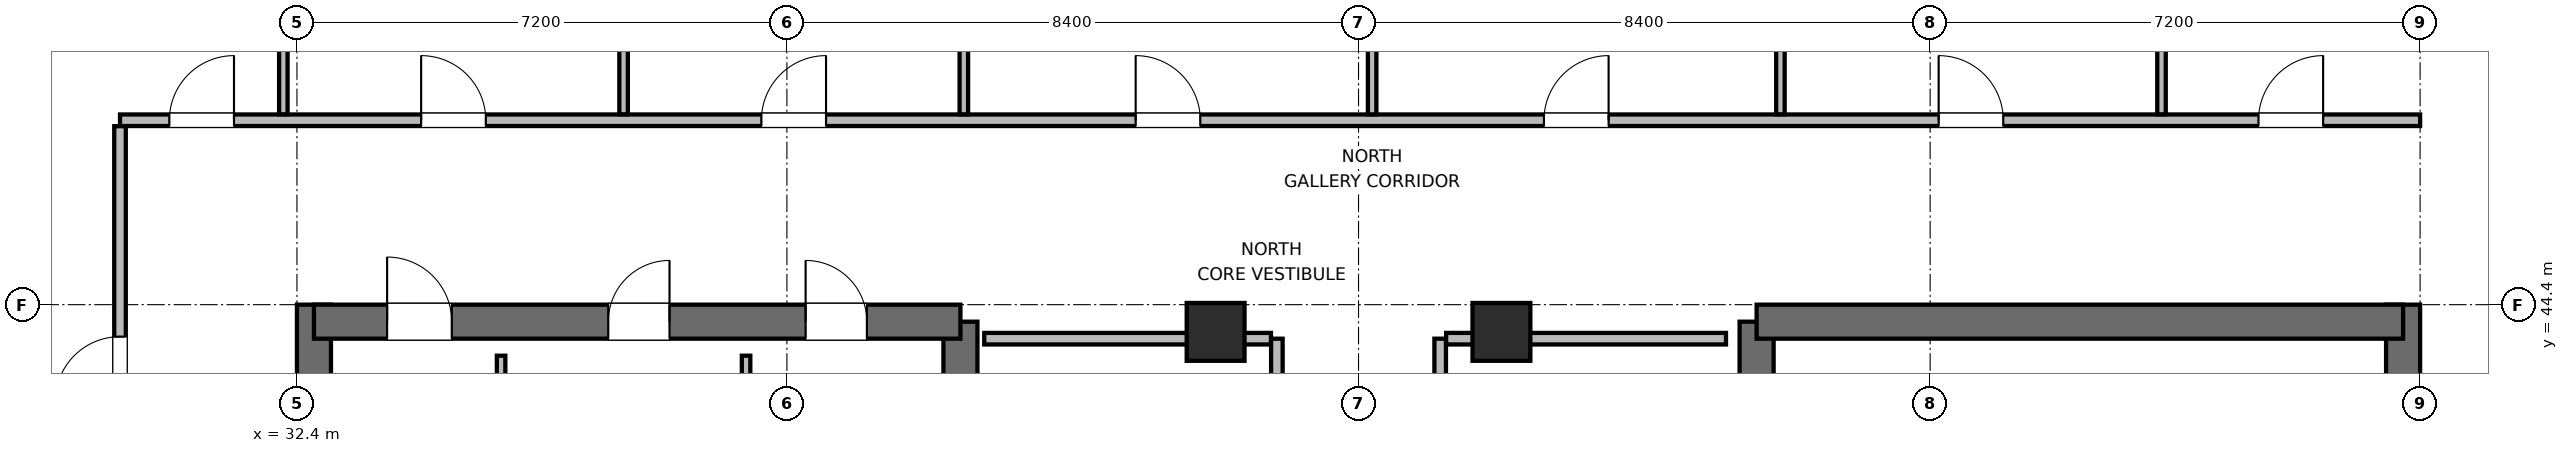
"""IFC4 building model, lengths in metres.
Left out: names, types, materials, properties, quantities, classifications, styles, units other than length and angle.
Written with IfcOpenShell. Run it as: python <this file> out.ifc"""

import sys

from ifc_helpers import new_model, si_unit, direction, frame, frame_2d, origin, origin_2d, place, context, subcontext, project, spatial, rectangle, extrude, element, fill, save


model = new_model("IFC4")
c1 = context("Model", 3, precision=1e-05, world=origin(), true_north=direction((0.0, 1.0)))
c2 = subcontext(c1, "Body", "Model", "MODEL_VIEW")
j1 = project(units=[si_unit("LENGTHUNIT", "METRE"), si_unit("PLANEANGLEUNIT", "RADIAN")], contexts=[c1])
p1 = place(None, origin())
s1 = spatial("IfcSite", under=j1, at=p1, CompositionType="ELEMENT")
p2 = place(p1, origin())
s2 = spatial("IfcBuilding", under=s1, at=p2, CompositionType="ELEMENT")
p3 = place(p2, frame((0.0, 0.0, 262.8)))
s3 = spatial("IfcBuildingStorey", under=s2, at=p3, CompositionType="ELEMENT", Elevation=262.8)
p4 = place(p3, frame((32.65, 27.6, 0.0), z_axis=(0.0, 0.0, 1.0), x_axis=(0.0, 1.0, 0.0)))
e1 = element("IfcWall", 1, at=p4, inside=s3, PredefinedType="SHEAR", context=c2, shape_type="SweptSolid", body=[
    extrude(rectangle(XDim=16.8, YDim=0.5, at=frame_2d((8.4, 0.0))), origin(), (0.0, 0.0, 1.0), 3.9),
])
p5 = place(p3, frame((42.15, 37.8, 0.0), z_axis=(0.0, 0.0, 1.0), x_axis=(0.0, 1.0, 0.0)))
e2 = element("IfcWall", 2, at=p5, inside=s3, PredefinedType="SHEAR", context=c2, shape_type="SweptSolid", body=[
    extrude(rectangle(XDim=6.35, YDim=0.5, at=frame_2d((3.175, 0.0))), origin(), (0.0, 0.0, 1.0), 3.9),
])
p6 = place(p3, frame((32.65, 44.15, 0.0), z_axis=(0.0, 0.0, 1.0), x_axis=(1.0, 0.0, 0.0)))
e3 = element("IfcWall", 3, at=p6, inside=s3, PredefinedType="SHEAR", context=c2, shape_type="SweptSolid", body=[
    extrude(rectangle(XDim=9.5, YDim=0.5, at=frame_2d((4.75, 0.0))), origin(), (0.0, 0.0, 1.0), 3.9),
])
p7 = place(p6, frame((1.075, 0.0, 0.0)))
e4 = element("IfcOpeningElement", 4, at=p7, cuts=e3, PredefinedType="OPENING", context=c2, shape_type="SweptSolid", body=[
    extrude(rectangle(XDim=0.95, YDim=2.04, at=frame_2d((0.475, 1.02))), frame((0.0, 0.26, 0.0), z_axis=(0.0, -1.0, 0.0), x_axis=(1.0, 0.0, 0.0)), (0.0, 0.0, 1.0), 0.52),
])
p8 = place(p6, frame((4.325, 0.0, 0.0)))
e5 = element("IfcOpeningElement", 5, at=p8, cuts=e3, PredefinedType="OPENING", context=c2, shape_type="SweptSolid", body=[
    extrude(rectangle(XDim=0.9, YDim=2.02, at=frame_2d((0.45, 1.01))), frame((0.0, 0.26, 0.0), z_axis=(0.0, -1.0, 0.0), x_axis=(1.0, 0.0, 0.0)), (0.0, 0.0, 1.0), 0.52),
])
p9 = place(p6, frame((7.225, 0.0, 0.0)))
e6 = element("IfcOpeningElement", 6, at=p9, cuts=e3, PredefinedType="OPENING", context=c2, shape_type="SweptSolid", body=[
    extrude(rectangle(XDim=0.9, YDim=2.02, at=frame_2d((0.45, 1.01))), frame((0.0, 0.26, 0.0), z_axis=(0.0, -1.0, 0.0), x_axis=(1.0, 0.0, 0.0)), (0.0, 0.0, 1.0), 0.52),
])
p10 = place(p3, frame((53.85, 38.0, 0.0), z_axis=(0.0, 0.0, 1.0), x_axis=(0.0, 1.0, 0.0)))
e7 = element("IfcWall", 7, at=p10, inside=s3, PredefinedType="SHEAR", context=c2, shape_type="SweptSolid", body=[
    extrude(rectangle(XDim=6.15, YDim=0.5, at=frame_2d((3.075, 0.0))), origin(), (0.0, 0.0, 1.0), 3.9),
])
p11 = place(p3, frame((63.35, 27.6, 0.0), z_axis=(0.0, 0.0, 1.0), x_axis=(0.0, 1.0, 0.0)))
e8 = element("IfcWall", 8, at=p11, inside=s3, PredefinedType="SHEAR", context=c2, shape_type="SweptSolid", body=[
    extrude(rectangle(XDim=16.8, YDim=0.5, at=frame_2d((8.4, 0.0))), origin(), (0.0, 0.0, 1.0), 3.9),
])
p12 = place(p3, frame((53.85, 44.15, 0.0), z_axis=(0.0, 0.0, 1.0), x_axis=(1.0, 0.0, 0.0)))
e9 = element("IfcWall", 9, at=p12, inside=s3, PredefinedType="SHEAR", context=c2, shape_type="SweptSolid", body=[
    extrude(rectangle(XDim=9.5, YDim=0.5, at=frame_2d((4.75, 0.0))), origin(), (0.0, 0.0, 1.0), 3.9),
])
for number, where, z_axis, x_axis in (
    (10, (45.9, 44.0, 0.0), (0.0, 0.0, 1.0), (1.0, 0.0, 0.0)),
    (11, (50.1, 44.0, 0.0), (0.0, 0.0, 1.0), (1.0, 0.0, 0.0)),
):
    element("IfcColumn", number, at=place(p3, frame(where, z_axis=z_axis, x_axis=x_axis)), inside=s3, PredefinedType="COLUMN", context=c2, shape_type="SweptSolid", body=[
        extrude(rectangle(XDim=0.85, YDim=0.85, at=origin_2d()), origin(), (0.0, 0.0, 1.0), 3.9),
    ])
for number, where, z_axis, x_axis in (
    (12, (35.4, 41.095, 0.0), (0.0, 0.0, 1.0), (0.0, 1.0, 0.0)),
    (13, (39.0, 41.095, 0.0), (0.0, 0.0, 1.0), (0.0, 1.0, 0.0)),
):
    element("IfcWall", number, at=place(p3, frame(where, z_axis=z_axis, x_axis=x_axis)), inside=s3, PredefinedType="PARTITIONING", context=c2, shape_type="SweptSolid", body=[
        extrude(rectangle(XDim=2.555, YDim=0.125, at=frame_2d((1.277, 0.0))), origin(), (0.0, 0.0, 1.0), 3.68),
    ])
p13 = place(p3, frame((46.8, 37.9, 0.0), z_axis=(0.0, 0.0, 1.0), x_axis=(0.0, 1.0, 0.0)))
e14 = element("IfcWall", 14, at=p13, inside=s3, PredefinedType="PARTITIONING", context=c2, shape_type="SweptSolid", body=[
    extrude(rectangle(XDim=6.0, YDim=0.17, at=frame_2d((3.0, 0.0))), origin(), (0.0, 0.0, 1.0), 3.68),
])
p14 = place(p13, frame((1.47, 0.0, 0.0)))
e15 = element("IfcOpeningElement", 15, at=p14, cuts=e14, PredefinedType="OPENING", context=c2, shape_type="SweptSolid", body=[
    extrude(rectangle(XDim=0.9, YDim=2.02, at=frame_2d((0.45, 1.01))), frame((0.0, 0.095, 0.0), z_axis=(0.0, -1.0, 0.0), x_axis=(1.0, 0.0, 0.0)), (0.0, 0.0, 1.0), 0.19),
])
p15 = place(p13, frame((4.47, 0.0, 0.0)))
e16 = element("IfcOpeningElement", 16, at=p15, cuts=e14, PredefinedType="OPENING", context=c2, shape_type="SweptSolid", body=[
    extrude(rectangle(XDim=0.9, YDim=2.02, at=frame_2d((0.45, 1.01))), frame((0.0, 0.095, 0.0), z_axis=(0.0, -1.0, 0.0), x_axis=(1.0, 0.0, 0.0)), (0.0, 0.0, 1.0), 0.19),
])
p16 = place(p3, frame((42.5, 43.9, 0.0), z_axis=(0.0, 0.0, 1.0), x_axis=(1.0, 0.0, 0.0)))
e17 = element("IfcWall", 17, at=p16, inside=s3, PredefinedType="PARTITIONING", context=c2, shape_type="SweptSolid", body=[
    extrude(rectangle(XDim=4.213, YDim=0.17, at=frame_2d((2.106, 0.0))), origin(), (0.0, 0.0, 1.0), 2.765),
])
p17 = place(p3, frame((49.2, 37.9, 0.0), z_axis=(0.0, 0.0, 1.0), x_axis=(0.0, 1.0, 0.0)))
e18 = element("IfcWall", 18, at=p17, inside=s3, PredefinedType="PARTITIONING", context=c2, shape_type="SweptSolid", body=[
    extrude(rectangle(XDim=6.0, YDim=0.17, at=frame_2d((3.0, 0.0))), origin(), (0.0, 0.0, 1.0), 3.68),
])
p18 = place(p17, frame((2.55, 0.0, 0.0)))
e19 = element("IfcOpeningElement", 19, at=p18, cuts=e18, PredefinedType="OPENING", context=c2, shape_type="SweptSolid", body=[
    extrude(rectangle(XDim=0.9, YDim=2.02, at=frame_2d((0.45, 1.01))), frame((0.0, 0.095, 0.0), z_axis=(0.0, -1.0, 0.0), x_axis=(1.0, 0.0, 0.0)), (0.0, 0.0, 1.0), 0.19),
])
p19 = place(p3, frame((49.287, 43.9, 0.0), z_axis=(0.0, 0.0, 1.0), x_axis=(1.0, 0.0, 0.0)))
e20 = element("IfcWall", 20, at=p19, inside=s3, PredefinedType="PARTITIONING", context=c2, shape_type="SweptSolid", body=[
    extrude(rectangle(XDim=4.113, YDim=0.17, at=frame_2d((2.056, 0.0))), origin(), (0.0, 0.0, 1.0), 2.765),
])
p20 = place(p3, frame((29.8, 47.11, 0.0), z_axis=(0.0, 0.0, 1.0), x_axis=(1.0, 0.0, 0.0)))
e21 = element("IfcWall", 21, at=p20, inside=s3, PredefinedType="PARTITIONING", context=c2, shape_type="SweptSolid", body=[
    extrude(rectangle(XDim=33.8, YDim=0.17, at=frame_2d((16.9, 0.0))), origin(), (0.0, 0.0, 1.0), 3.68),
])
p21 = place(p20, frame((0.725, 0.0, 0.0)))
e22 = element("IfcOpeningElement", 22, at=p21, cuts=e21, PredefinedType="OPENING", context=c2, shape_type="SweptSolid", body=[
    extrude(rectangle(XDim=0.95, YDim=2.04, at=frame_2d((0.475, 1.02))), frame((0.0, 0.095, 0.0), z_axis=(0.0, -1.0, 0.0), x_axis=(1.0, 0.0, 0.0)), (0.0, 0.0, 1.0), 0.19),
])
p22 = place(p20, frame((4.425, 0.0, 0.0)))
e23 = element("IfcOpeningElement", 23, at=p22, cuts=e21, PredefinedType="OPENING", context=c2, shape_type="SweptSolid", body=[
    extrude(rectangle(XDim=0.95, YDim=2.04, at=frame_2d((0.475, 1.02))), frame((0.0, 0.095, 0.0), z_axis=(0.0, -1.0, 0.0), x_axis=(1.0, 0.0, 0.0)), (0.0, 0.0, 1.0), 0.19),
])
p23 = place(p20, frame((9.425, 0.0, 0.0)))
e24 = element("IfcOpeningElement", 24, at=p23, cuts=e21, PredefinedType="OPENING", context=c2, shape_type="SweptSolid", body=[
    extrude(rectangle(XDim=0.95, YDim=2.04, at=frame_2d((0.475, 1.02))), frame((0.0, 0.095, 0.0), z_axis=(0.0, -1.0, 0.0), x_axis=(1.0, 0.0, 0.0)), (0.0, 0.0, 1.0), 0.19),
])
p24 = place(p20, frame((14.925, 0.0, 0.0)))
e25 = element("IfcOpeningElement", 25, at=p24, cuts=e21, PredefinedType="OPENING", context=c2, shape_type="SweptSolid", body=[
    extrude(rectangle(XDim=0.95, YDim=2.04, at=frame_2d((0.475, 1.02))), frame((0.0, 0.095, 0.0), z_axis=(0.0, -1.0, 0.0), x_axis=(1.0, 0.0, 0.0)), (0.0, 0.0, 1.0), 0.19),
])
p25 = place(p20, frame((20.925, 0.0, 0.0)))
e26 = element("IfcOpeningElement", 26, at=p25, cuts=e21, PredefinedType="OPENING", context=c2, shape_type="SweptSolid", body=[
    extrude(rectangle(XDim=0.95, YDim=2.04, at=frame_2d((0.475, 1.02))), frame((0.0, 0.095, 0.0), z_axis=(0.0, -1.0, 0.0), x_axis=(1.0, 0.0, 0.0)), (0.0, 0.0, 1.0), 0.19),
])
p26 = place(p20, frame((26.725, 0.0, 0.0)))
e27 = element("IfcOpeningElement", 27, at=p26, cuts=e21, PredefinedType="OPENING", context=c2, shape_type="SweptSolid", body=[
    extrude(rectangle(XDim=0.95, YDim=2.04, at=frame_2d((0.475, 1.02))), frame((0.0, 0.095, 0.0), z_axis=(0.0, -1.0, 0.0), x_axis=(1.0, 0.0, 0.0)), (0.0, 0.0, 1.0), 0.19),
])
p27 = place(p20, frame((31.425, 0.0, 0.0)))
e28 = element("IfcOpeningElement", 28, at=p27, cuts=e21, PredefinedType="OPENING", context=c2, shape_type="SweptSolid", body=[
    extrude(rectangle(XDim=0.95, YDim=2.04, at=frame_2d((0.475, 1.02))), frame((0.0, 0.095, 0.0), z_axis=(0.0, -1.0, 0.0), x_axis=(1.0, 0.0, 0.0)), (0.0, 0.0, 1.0), 0.19),
])
p28 = place(p3, frame((29.8, 24.977, 0.0), z_axis=(0.0, 0.0, 1.0), x_axis=(0.0, 1.0, 0.0)))
e29 = element("IfcWall", 29, at=p28, inside=s3, PredefinedType="PARTITIONING", context=c2, shape_type="SweptSolid", body=[
    extrude(rectangle(XDim=22.046, YDim=0.17, at=frame_2d((11.023, 0.0))), origin(), (0.0, 0.0, 1.0), 3.68),
])
p29 = place(p28, frame((3.693, 0.0, 0.0)))
e30 = element("IfcOpeningElement", 30, at=p29, cuts=e29, PredefinedType="OPENING", context=c2, shape_type="SweptSolid", body=[
    extrude(rectangle(XDim=0.95, YDim=2.04, at=frame_2d((0.475, 1.02))), frame((0.0, 0.095, 0.0), z_axis=(0.0, -1.0, 0.0), x_axis=(1.0, 0.0, 0.0)), (0.0, 0.0, 1.0), 0.19),
])
p30 = place(p28, frame((11.148, 0.0, 0.0)))
e31 = element("IfcOpeningElement", 31, at=p30, cuts=e29, PredefinedType="OPENING", context=c2, shape_type="SweptSolid", body=[
    extrude(rectangle(XDim=0.95, YDim=2.04, at=frame_2d((0.475, 1.02))), frame((0.0, 0.095, 0.0), z_axis=(0.0, -1.0, 0.0), x_axis=(1.0, 0.0, 0.0)), (0.0, 0.0, 1.0), 0.19),
])
p31 = place(p28, frame((18.003, 0.0, 0.0)))
e32 = element("IfcOpeningElement", 32, at=p31, cuts=e29, PredefinedType="OPENING", context=c2, shape_type="SweptSolid", body=[
    extrude(rectangle(XDim=0.95, YDim=2.04, at=frame_2d((0.475, 1.02))), frame((0.0, 0.095, 0.0), z_axis=(0.0, -1.0, 0.0), x_axis=(1.0, 0.0, 0.0)), (0.0, 0.0, 1.0), 0.19),
])
p32 = place(p3, frame((32.2, 47.197, 0.0), z_axis=(0.0, 0.0, 1.0), x_axis=(0.0, 1.0, 0.0)))
e33 = element("IfcWall", 33, at=p32, inside=s3, PredefinedType="PARTITIONING", context=c2, shape_type="SweptSolid", body=[
    extrude(rectangle(XDim=5.968, YDim=0.125, at=frame_2d((2.984, 0.0))), origin(), (0.0, 0.0, 1.0), 3.054),
])
p33 = place(p3, frame((37.2, 47.197, 0.0), z_axis=(0.0, 0.0, 1.0), x_axis=(0.0, 1.0, 0.0)))
e34 = element("IfcWall", 34, at=p33, inside=s3, PredefinedType="PARTITIONING", context=c2, shape_type="SweptSolid", body=[
    extrude(rectangle(XDim=5.968, YDim=0.125, at=frame_2d((2.984, 0.0))), origin(), (0.0, 0.0, 1.0), 3.68),
])
p34 = place(p3, frame((42.2, 47.197, 0.0), z_axis=(0.0, 0.0, 1.0), x_axis=(0.0, 1.0, 0.0)))
e35 = element("IfcWall", 35, at=p34, inside=s3, PredefinedType="PARTITIONING", context=c2, shape_type="SweptSolid", body=[
    extrude(rectangle(XDim=5.528, YDim=0.125, at=frame_2d((2.764, 0.0))), origin(), (0.0, 0.0, 1.0), 3.043),
])
p35 = place(p3, frame((48.2, 47.197, 0.0), z_axis=(0.0, 0.0, 1.0), x_axis=(0.0, 1.0, 0.0)))
e36 = element("IfcWall", 36, at=p35, inside=s3, PredefinedType="PARTITIONING", context=c2, shape_type="SweptSolid", body=[
    extrude(rectangle(XDim=4.728, YDim=0.125, at=frame_2d((2.364, 0.0))), origin(), (0.0, 0.0, 1.0), 3.054),
])
p36 = place(p3, frame((54.2, 47.197, 0.0), z_axis=(0.0, 0.0, 1.0), x_axis=(0.0, 1.0, 0.0)))
e37 = element("IfcWall", 37, at=p36, inside=s3, PredefinedType="PARTITIONING", context=c2, shape_type="SweptSolid", body=[
    extrude(rectangle(XDim=5.713, YDim=0.125, at=frame_2d((2.856, 0.0))), origin(), (0.0, 0.0, 1.0), 3.043),
])
p37 = place(p3, frame((59.8, 47.197, 0.0), z_axis=(0.0, 0.0, 1.0), x_axis=(0.0, 1.0, 0.0)))
e38 = element("IfcWall", 38, at=p37, inside=s3, PredefinedType="PARTITIONING", context=c2, shape_type="SweptSolid", body=[
    extrude(rectangle(XDim=5.928, YDim=0.125, at=frame_2d((2.964, 0.0))), origin(), (0.0, 0.0, 1.0), 3.68),
])
p38 = place(p7, origin())
e39 = element("IfcDoor", 39, at=p38, inside=s3, OperationType="SINGLE_SWING_LEFT", PredefinedType="DOOR", context=c2, shape_type="SweptSolid", body=[
    extrude(rectangle(XDim=0.95, YDim=2.04, at=frame_2d((0.475, 1.02))), frame((0.0, 0.025, 0.0), z_axis=(0.0, -1.0, 0.0), x_axis=(1.0, 0.0, 0.0)), (0.0, 0.0, 1.0), 0.05),
])
fill(e4, e39)
p39 = place(p8, origin())
e40 = element("IfcDoor", 40, at=p39, inside=s3, OperationType="SINGLE_SWING_RIGHT", PredefinedType="DOOR", context=c2, shape_type="SweptSolid", body=[
    extrude(rectangle(XDim=0.9, YDim=2.02, at=frame_2d((0.45, 1.01))), frame((0.0, 0.025, 0.0), z_axis=(0.0, -1.0, 0.0), x_axis=(1.0, 0.0, 0.0)), (0.0, 0.0, 1.0), 0.05),
])
fill(e5, e40)
p40 = place(p9, origin())
e41 = element("IfcDoor", 41, at=p40, inside=s3, OperationType="SINGLE_SWING_LEFT", PredefinedType="DOOR", context=c2, shape_type="SweptSolid", body=[
    extrude(rectangle(XDim=0.9, YDim=2.02, at=frame_2d((0.45, 1.01))), frame((0.0, 0.025, 0.0), z_axis=(0.0, -1.0, 0.0), x_axis=(1.0, 0.0, 0.0)), (0.0, 0.0, 1.0), 0.05),
])
fill(e6, e41)
p41 = place(p21, origin())
e42 = element("IfcDoor", 42, at=p41, inside=s3, OperationType="SINGLE_SWING_RIGHT", PredefinedType="DOOR", context=c2, shape_type="SweptSolid", body=[
    extrude(rectangle(XDim=0.95, YDim=2.04, at=frame_2d((0.475, 1.02))), frame((0.0, 0.025, 0.0), z_axis=(0.0, -1.0, 0.0), x_axis=(1.0, 0.0, 0.0)), (0.0, 0.0, 1.0), 0.05),
])
fill(e22, e42)
p42 = place(p22, origin())
e43 = element("IfcDoor", 43, at=p42, inside=s3, OperationType="SINGLE_SWING_LEFT", PredefinedType="DOOR", context=c2, shape_type="SweptSolid", body=[
    extrude(rectangle(XDim=0.95, YDim=2.04, at=frame_2d((0.475, 1.02))), frame((0.0, 0.025, 0.0), z_axis=(0.0, -1.0, 0.0), x_axis=(1.0, 0.0, 0.0)), (0.0, 0.0, 1.0), 0.05),
])
fill(e23, e43)
p43 = place(p23, origin())
e44 = element("IfcDoor", 44, at=p43, inside=s3, OperationType="SINGLE_SWING_RIGHT", PredefinedType="DOOR", context=c2, shape_type="SweptSolid", body=[
    extrude(rectangle(XDim=0.95, YDim=2.04, at=frame_2d((0.475, 1.02))), frame((0.0, 0.025, 0.0), z_axis=(0.0, -1.0, 0.0), x_axis=(1.0, 0.0, 0.0)), (0.0, 0.0, 1.0), 0.05),
])
fill(e24, e44)
p44 = place(p24, origin())
e45 = element("IfcDoor", 45, at=p44, inside=s3, OperationType="SINGLE_SWING_LEFT", PredefinedType="DOOR", context=c2, shape_type="SweptSolid", body=[
    extrude(rectangle(XDim=0.95, YDim=2.04, at=frame_2d((0.475, 1.02))), frame((0.0, 0.025, 0.0), z_axis=(0.0, -1.0, 0.0), x_axis=(1.0, 0.0, 0.0)), (0.0, 0.0, 1.0), 0.05),
])
fill(e25, e45)
p45 = place(p25, origin())
e46 = element("IfcDoor", 46, at=p45, inside=s3, OperationType="SINGLE_SWING_RIGHT", PredefinedType="DOOR", context=c2, shape_type="SweptSolid", body=[
    extrude(rectangle(XDim=0.95, YDim=2.04, at=frame_2d((0.475, 1.02))), frame((0.0, 0.025, 0.0), z_axis=(0.0, -1.0, 0.0), x_axis=(1.0, 0.0, 0.0)), (0.0, 0.0, 1.0), 0.05),
])
fill(e26, e46)
p46 = place(p26, origin())
e47 = element("IfcDoor", 47, at=p46, inside=s3, OperationType="SINGLE_SWING_LEFT", PredefinedType="DOOR", context=c2, shape_type="SweptSolid", body=[
    extrude(rectangle(XDim=0.95, YDim=2.04, at=frame_2d((0.475, 1.02))), frame((0.0, 0.025, 0.0), z_axis=(0.0, -1.0, 0.0), x_axis=(1.0, 0.0, 0.0)), (0.0, 0.0, 1.0), 0.05),
])
fill(e27, e47)
p47 = place(p27, origin())
e48 = element("IfcDoor", 48, at=p47, inside=s3, OperationType="SINGLE_SWING_RIGHT", PredefinedType="DOOR", context=c2, shape_type="SweptSolid", body=[
    extrude(rectangle(XDim=0.95, YDim=2.04, at=frame_2d((0.475, 1.02))), frame((0.0, 0.025, 0.0), z_axis=(0.0, -1.0, 0.0), x_axis=(1.0, 0.0, 0.0)), (0.0, 0.0, 1.0), 0.05),
])
fill(e28, e48)
p48 = place(p31, origin())
e49 = element("IfcDoor", 49, at=p48, inside=s3, OperationType="SINGLE_SWING_LEFT", PredefinedType="DOOR", context=c2, shape_type="SweptSolid", body=[
    extrude(rectangle(XDim=0.95, YDim=2.04, at=frame_2d((0.475, 1.02))), frame((0.0, 0.025, 0.0), z_axis=(0.0, -1.0, 0.0), x_axis=(1.0, 0.0, 0.0)), (0.0, 0.0, 1.0), 0.05),
])
fill(e32, e49)
save(model, sys.argv[1])
